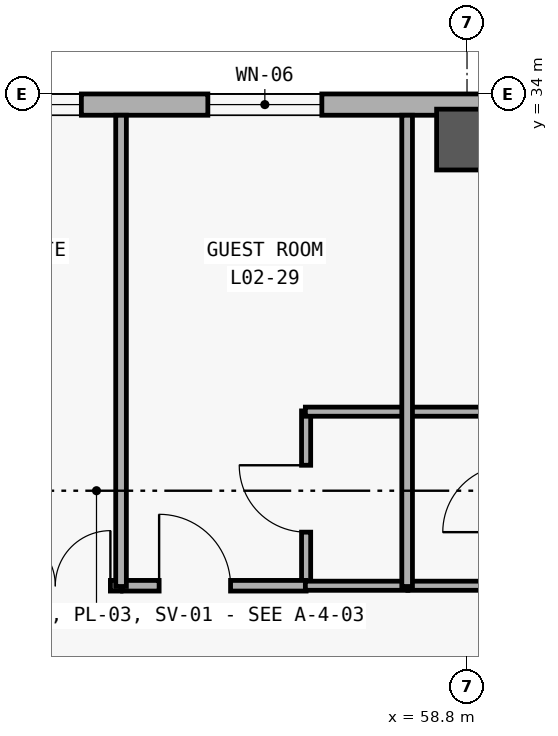
"""IFC4 building model, lengths in metres.
Left out: names, types, materials, properties, quantities, classifications, styles, units other than length and angle.
Written with IfcOpenShell. Run it as: python <this file> out.ifc"""

import sys

from ifc_helpers import new_model, si_unit, direction, frame, frame_2d, origin, origin_2d, place, context, subcontext, project, spatial, rectangle, extrude, element, fill, save


model = new_model("IFC4")
c1 = context("Model", 3, precision=1e-05, world=origin(), true_north=direction((0.0, 1.0)))
c2 = subcontext(c1, "Body", "Model", "MODEL_VIEW")
j1 = project(units=[si_unit("LENGTHUNIT", "METRE"), si_unit("PLANEANGLEUNIT", "RADIAN")], contexts=[c1])
p1 = place(None, origin())
s1 = spatial("IfcSite", under=j1, at=p1, CompositionType="ELEMENT")
p2 = place(p1, origin())
s2 = spatial("IfcBuilding", under=s1, at=p2, CompositionType="ELEMENT")
p3 = place(p2, frame((0.0, 0.0, 10.8)))
s3 = spatial("IfcBuildingStorey", under=s2, at=p3, CompositionType="ELEMENT", Elevation=10.8)
p4 = place(p3, frame((58.8, 33.4, 0.0), z_axis=(0.0, 0.0, 1.0), x_axis=(1.0, 0.0, 0.0)))
e1 = element("IfcColumn", 1, at=p4, inside=s3, PredefinedType="COLUMN", context=c2, shape_type="SweptSolid", body=[
    extrude(rectangle(XDim=0.8, YDim=0.8, at=origin_2d()), origin(), (0.0, 0.0, 1.0), 4.2),
])
p5 = place(p3, frame((8.68, 33.86, 0.0), z_axis=(0.0, 0.0, 1.0), x_axis=(1.0, 0.0, 0.0)))
e2 = element("IfcWall", 2, at=p5, inside=s3, PredefinedType="SOLIDWALL", context=c2, shape_type="SweptSolid", body=[
    extrude(rectangle(XDim=83.44, YDim=0.28, at=frame_2d((41.72, 0.0))), origin(), (0.0, 0.0, 1.0), 3.92),
])
p6 = place(p5, frame((5.07, 0.0, 0.85)))
e3 = element("IfcOpeningElement", 3, at=p6, cuts=e2, PredefinedType="OPENING", context=c2, shape_type="SweptSolid", body=[
    extrude(rectangle(XDim=1.7, YDim=2.0, at=frame_2d((0.85, 1.0))), frame((0.0, 0.15, 0.0), z_axis=(0.0, -1.0, 0.0), x_axis=(1.0, 0.0, 0.0)), (0.0, 0.0, 1.0), 0.3),
])
p7 = place(p5, frame((12.557, 0.0, 0.85)))
e4 = element("IfcOpeningElement", 4, at=p7, cuts=e2, PredefinedType="OPENING", context=c2, shape_type="SweptSolid", body=[
    extrude(rectangle(XDim=2.05, YDim=1.95, at=frame_2d((1.025, 0.975))), frame((0.0, 0.15, 0.0), z_axis=(0.0, -1.0, 0.0), x_axis=(1.0, 0.0, 0.0)), (0.0, 0.0, 1.0), 0.3),
])
p8 = place(p5, frame((16.256, 0.0, 0.85)))
e5 = element("IfcOpeningElement", 5, at=p8, cuts=e2, PredefinedType="OPENING", context=c2, shape_type="SweptSolid", body=[
    extrude(rectangle(XDim=2.18, YDim=1.95, at=frame_2d((1.09, 0.975))), frame((0.0, 0.15, 0.0), z_axis=(0.0, -1.0, 0.0), x_axis=(1.0, 0.0, 0.0)), (0.0, 0.0, 1.0), 0.3),
])
p9 = place(p5, frame((19.921, 0.0, 0.85)))
e6 = element("IfcOpeningElement", 6, at=p9, cuts=e2, PredefinedType="OPENING", context=c2, shape_type="SweptSolid", body=[
    extrude(rectangle(XDim=2.38, YDim=1.95, at=frame_2d((1.19, 0.975))), frame((0.0, 0.15, 0.0), z_axis=(0.0, -1.0, 0.0), x_axis=(1.0, 0.0, 0.0)), (0.0, 0.0, 1.0), 0.3),
])
p10 = place(p5, frame((23.635, 0.0, 0.85)))
e7 = element("IfcOpeningElement", 7, at=p10, cuts=e2, PredefinedType="OPENING", context=c2, shape_type="SweptSolid", body=[
    extrude(rectangle(XDim=2.48, YDim=2.0, at=frame_2d((1.24, 1.0))), frame((0.0, 0.15, 0.0), z_axis=(0.0, -1.0, 0.0), x_axis=(1.0, 0.0, 0.0)), (0.0, 0.0, 1.0), 0.3),
])
p11 = place(p5, frame((27.314, 0.0, 0.85)))
e8 = element("IfcOpeningElement", 8, at=p11, cuts=e2, PredefinedType="OPENING", context=c2, shape_type="SweptSolid", body=[
    extrude(rectangle(XDim=2.65, YDim=2.0, at=frame_2d((1.325, 1.0))), frame((0.0, 0.15, 0.0), z_axis=(0.0, -1.0, 0.0), x_axis=(1.0, 0.0, 0.0)), (0.0, 0.0, 1.0), 0.3),
])
p12 = place(p5, frame((31.503, 0.0, 0.85)))
e9 = element("IfcOpeningElement", 9, at=p12, cuts=e2, PredefinedType="OPENING", context=c2, shape_type="SweptSolid", body=[
    extrude(rectangle(XDim=1.8, YDim=1.8, at=frame_2d((0.9, 0.9))), frame((0.0, 0.15, 0.0), z_axis=(0.0, -1.0, 0.0), x_axis=(1.0, 0.0, 0.0)), (0.0, 0.0, 1.0), 0.3),
])
p13 = place(p5, frame((35.117, 0.0, 0.85)))
e10 = element("IfcOpeningElement", 10, at=p13, cuts=e2, PredefinedType="OPENING", context=c2, shape_type="SweptSolid", body=[
    extrude(rectangle(XDim=2.1, YDim=1.8, at=frame_2d((1.05, 0.9))), frame((0.0, 0.15, 0.0), z_axis=(0.0, -1.0, 0.0), x_axis=(1.0, 0.0, 0.0)), (0.0, 0.0, 1.0), 0.3),
])
p14 = place(p5, frame((38.731, 0.0, 0.85)))
e11 = element("IfcOpeningElement", 11, at=p14, cuts=e2, PredefinedType="OPENING", context=c2, shape_type="SweptSolid", body=[
    extrude(rectangle(XDim=2.4, YDim=1.8, at=frame_2d((1.2, 0.9))), frame((0.0, 0.15, 0.0), z_axis=(0.0, -1.0, 0.0), x_axis=(1.0, 0.0, 0.0)), (0.0, 0.0, 1.0), 0.3),
])
p15 = place(p5, frame((42.346, 0.0, 0.85)))
e12 = element("IfcOpeningElement", 12, at=p15, cuts=e2, PredefinedType="OPENING", context=c2, shape_type="SweptSolid", body=[
    extrude(rectangle(XDim=2.7, YDim=1.85, at=frame_2d((1.35, 0.925))), frame((0.0, 0.15, 0.0), z_axis=(0.0, -1.0, 0.0), x_axis=(1.0, 0.0, 0.0)), (0.0, 0.0, 1.0), 0.3),
])
p16 = place(p5, frame((46.71, 0.0, 0.85)))
e13 = element("IfcOpeningElement", 13, at=p16, cuts=e2, PredefinedType="OPENING", context=c2, shape_type="SweptSolid", body=[
    extrude(rectangle(XDim=1.5, YDim=1.75, at=frame_2d((0.75, 0.875))), frame((0.0, 0.15, 0.0), z_axis=(0.0, -1.0, 0.0), x_axis=(1.0, 0.0, 0.0)), (0.0, 0.0, 1.0), 0.3),
])
p17 = place(p5, frame((50.399, 0.0, 0.85)))
e14 = element("IfcOpeningElement", 14, at=p17, cuts=e2, PredefinedType="OPENING", context=c2, shape_type="SweptSolid", body=[
    extrude(rectangle(XDim=1.65, YDim=1.75, at=frame_2d((0.825, 0.875))), frame((0.0, 0.15, 0.0), z_axis=(0.0, -1.0, 0.0), x_axis=(1.0, 0.0, 0.0)), (0.0, 0.0, 1.0), 0.3),
])
p18 = place(p5, frame((54.014, 0.0, 0.85)))
e15 = element("IfcOpeningElement", 15, at=p18, cuts=e2, PredefinedType="OPENING", context=c2, shape_type="SweptSolid", body=[
    extrude(rectangle(XDim=1.95, YDim=1.75, at=frame_2d((0.975, 0.875))), frame((0.0, 0.15, 0.0), z_axis=(0.0, -1.0, 0.0), x_axis=(1.0, 0.0, 0.0)), (0.0, 0.0, 1.0), 0.3),
])
p19 = place(p5, frame((57.628, 0.0, 0.85)))
e16 = element("IfcOpeningElement", 16, at=p19, cuts=e2, PredefinedType="OPENING", context=c2, shape_type="SweptSolid", body=[
    extrude(rectangle(XDim=2.25, YDim=1.75, at=frame_2d((1.125, 0.875))), frame((0.0, 0.15, 0.0), z_axis=(0.0, -1.0, 0.0), x_axis=(1.0, 0.0, 0.0)), (0.0, 0.0, 1.0), 0.3),
])
p20 = place(p5, frame((61.242, 0.0, 0.85)))
e17 = element("IfcOpeningElement", 17, at=p20, cuts=e2, PredefinedType="OPENING", context=c2, shape_type="SweptSolid", body=[
    extrude(rectangle(XDim=2.55, YDim=1.8, at=frame_2d((1.275, 0.9))), frame((0.0, 0.15, 0.0), z_axis=(0.0, -1.0, 0.0), x_axis=(1.0, 0.0, 0.0)), (0.0, 0.0, 1.0), 0.3),
])
p21 = place(p5, frame((64.856, 0.0, 0.85)))
e18 = element("IfcOpeningElement", 18, at=p21, cuts=e2, PredefinedType="OPENING", context=c2, shape_type="SweptSolid", body=[
    extrude(rectangle(XDim=2.85, YDim=1.85, at=frame_2d((1.425, 0.925))), frame((0.0, 0.15, 0.0), z_axis=(0.0, -1.0, 0.0), x_axis=(1.0, 0.0, 0.0)), (0.0, 0.0, 1.0), 0.3),
])
p22 = place(p5, frame((69.345, 0.0, 0.85)))
e19 = element("IfcOpeningElement", 19, at=p22, cuts=e2, PredefinedType="OPENING", context=c2, shape_type="SweptSolid", body=[
    extrude(rectangle(XDim=1.4, YDim=1.6, at=frame_2d((0.7, 0.8))), frame((0.0, 0.15, 0.0), z_axis=(0.0, -1.0, 0.0), x_axis=(1.0, 0.0, 0.0)), (0.0, 0.0, 1.0), 0.3),
])
p23 = place(p5, frame((73.009, 0.0, 0.85)))
e20 = element("IfcOpeningElement", 20, at=p23, cuts=e2, PredefinedType="OPENING", context=c2, shape_type="SweptSolid", body=[
    extrude(rectangle(XDim=1.6, YDim=1.6, at=frame_2d((0.8, 0.8))), frame((0.0, 0.15, 0.0), z_axis=(0.0, -1.0, 0.0), x_axis=(1.0, 0.0, 0.0)), (0.0, 0.0, 1.0), 0.3),
])
p24 = place(p5, frame((76.674, 0.0, 0.85)))
e21 = element("IfcOpeningElement", 21, at=p24, cuts=e2, PredefinedType="OPENING", context=c2, shape_type="SweptSolid", body=[
    extrude(rectangle(XDim=1.8, YDim=1.6, at=frame_2d((0.9, 0.8))), frame((0.0, 0.15, 0.0), z_axis=(0.0, -1.0, 0.0), x_axis=(1.0, 0.0, 0.0)), (0.0, 0.0, 1.0), 0.3),
])
p25 = place(p5, frame((80.338, 0.0, 0.85)))
e22 = element("IfcOpeningElement", 22, at=p25, cuts=e2, PredefinedType="OPENING", context=c2, shape_type="SweptSolid", body=[
    extrude(rectangle(XDim=2.0, YDim=1.65, at=frame_2d((1.0, 0.825))), frame((0.0, 0.15, 0.0), z_axis=(0.0, -1.0, 0.0), x_axis=(1.0, 0.0, 0.0)), (0.0, 0.0, 1.0), 0.3),
])
p26 = place(p3, frame((56.683, 27.52, 0.0), z_axis=(0.0, 0.0, 1.0), x_axis=(0.0, 1.0, 0.0)))
e23 = element("IfcWall", 23, at=p26, inside=s3, PredefinedType="PARTITIONING", context=c2, shape_type="SweptSolid", body=[
    extrude(rectangle(XDim=2.31, YDim=0.12, at=frame_2d((1.155, 0.0))), origin(), (0.0, 0.0, 1.0), 3.02),
])
p27 = place(p26, frame((0.715, 0.0, 0.0)))
e24 = element("IfcOpeningElement", 24, at=p27, cuts=e23, PredefinedType="OPENING", context=c2, shape_type="SweptSolid", body=[
    extrude(rectangle(XDim=0.88, YDim=2.15, at=frame_2d((0.44, 1.075))), frame((0.0, 0.07, 0.0), z_axis=(0.0, -1.0, 0.0), x_axis=(1.0, 0.0, 0.0)), (0.0, 0.0, 1.0), 0.14),
])
p28 = place(p3, frame((51.833, 27.53, 0.0), z_axis=(0.0, 0.0, 1.0), x_axis=(1.0, 0.0, 0.0)))
e25 = element("IfcWall", 25, at=p28, inside=s3, PredefinedType="PARTITIONING", context=c2, shape_type="SweptSolid", body=[
    extrude(rectangle(XDim=2.415, YDim=0.14, at=frame_2d((1.208, 0.0))), origin(), (0.0, 0.0, 1.0), 3.02),
])
p29 = place(p28, frame((0.825, 0.0, 0.0)))
e26 = element("IfcOpeningElement", 26, at=p29, cuts=e25, PredefinedType="OPENING", context=c2, shape_type="SweptSolid", body=[
    extrude(rectangle(XDim=1.45, YDim=2.3, at=frame_2d((0.725, 1.15))), frame((0.0, 0.08, 0.0), z_axis=(0.0, -1.0, 0.0), x_axis=(1.0, 0.0, 0.0)), (0.0, 0.0, 1.0), 0.16),
])
p30 = place(p3, frame((54.268, 27.53, 0.0), z_axis=(0.0, 0.0, 1.0), x_axis=(1.0, 0.0, 0.0)))
e27 = element("IfcWall", 27, at=p30, inside=s3, PredefinedType="PARTITIONING", context=c2, shape_type="SweptSolid", body=[
    extrude(rectangle(XDim=2.415, YDim=0.14, at=frame_2d((1.208, 0.0))), origin(), (0.0, 0.0, 1.0), 3.02),
])
p31 = place(p30, frame((0.481, 0.0, 0.0)))
e28 = element("IfcOpeningElement", 28, at=p31, cuts=e27, PredefinedType="OPENING", context=c2, shape_type="SweptSolid", body=[
    extrude(rectangle(XDim=0.94, YDim=2.2, at=frame_2d((0.47, 1.1))), frame((0.0, 0.08, 0.0), z_axis=(0.0, -1.0, 0.0), x_axis=(1.0, 0.0, 0.0)), (0.0, 0.0, 1.0), 0.16),
])
for number, where, z_axis, x_axis in (
    (29, (56.673, 27.53, 0.0), (0.0, 0.0, 1.0), (1.0, 0.0, 0.0)),
    (30, (56.673, 29.82, 0.0), (0.0, 0.0, 1.0), (1.0, 0.0, 0.0)),
):
    element("IfcWall", number, at=place(p3, frame(where, z_axis=z_axis, x_axis=x_axis)), inside=s3, PredefinedType="PARTITIONING", context=c2, shape_type="SweptSolid", body=[
        extrude(rectangle(XDim=1.349, YDim=0.12, at=frame_2d((0.674, 0.0))), origin(), (0.0, 0.0, 1.0), 3.02),
    ])
p32 = place(p3, frame((58.022, 27.53, 0.0), z_axis=(0.0, 0.0, 1.0), x_axis=(1.0, 0.0, 0.0)))
e31 = element("IfcWall", 31, at=p32, inside=s3, PredefinedType="PARTITIONING", context=c2, shape_type="SweptSolid", body=[
    extrude(rectangle(XDim=1.339, YDim=0.12, at=frame_2d((0.669, 0.0))), origin(), (0.0, 0.0, 1.0), 3.02),
])
p33 = place(p3, frame((58.022, 29.82, 0.0), z_axis=(0.0, 0.0, 1.0), x_axis=(1.0, 0.0, 0.0)))
e32 = element("IfcWall", 32, at=p33, inside=s3, PredefinedType="PARTITIONING", context=c2, shape_type="SweptSolid", body=[
    extrude(rectangle(XDim=1.349, YDim=0.12, at=frame_2d((0.675, 0.0))), origin(), (0.0, 0.0, 1.0), 3.02),
])
for number, where, z_axis, x_axis in (
    (33, (54.248, 27.52, 0.0), (0.0, 0.0, 1.0), (0.0, 1.0, 0.0)),
    (34, (58.012, 27.52, 0.0), (0.0, 0.0, 1.0), (0.0, 1.0, 0.0)),
):
    element("IfcWall", number, at=place(p3, frame(where, z_axis=z_axis, x_axis=x_axis)), inside=s3, PredefinedType="PARTITIONING", context=c2, shape_type="SweptSolid", body=[
        extrude(rectangle(XDim=6.2, YDim=0.14, at=frame_2d((3.1, 0.0))), origin(), (0.0, 0.0, 1.0), 3.02),
    ])
p34 = place(p15, origin())
e35 = element("IfcWindow", 35, at=p34, inside=s3, PartitioningType="SINGLE_PANEL", PredefinedType="WINDOW", context=c2, shape_type="SweptSolid", body=[
    extrude(rectangle(XDim=2.7, YDim=1.85, at=frame_2d((1.35, 0.925))), frame((0.0, 0.03, 0.0), z_axis=(0.0, -1.0, 0.0), x_axis=(1.0, 0.0, 0.0)), (0.0, 0.0, 1.0), 0.06),
])
fill(e12, e35)
p35 = place(p16, origin())
e36 = element("IfcWindow", 36, at=p35, inside=s3, PartitioningType="SINGLE_PANEL", PredefinedType="WINDOW", context=c2, shape_type="SweptSolid", body=[
    extrude(rectangle(XDim=1.5, YDim=1.75, at=frame_2d((0.75, 0.875))), frame((0.0, 0.03, 0.0), z_axis=(0.0, -1.0, 0.0), x_axis=(1.0, 0.0, 0.0)), (0.0, 0.0, 1.0), 0.06),
])
fill(e13, e36)
p36 = place(p27, origin())
e37 = element("IfcDoor", 37, at=p36, inside=s3, OperationType="SINGLE_SWING_RIGHT", PredefinedType="DOOR", context=c2, shape_type="SweptSolid", body=[
    extrude(rectangle(XDim=0.88, YDim=2.15, at=frame_2d((0.44, 1.075))), frame((0.0, 0.025, 0.0), z_axis=(0.0, -1.0, 0.0), x_axis=(1.0, 0.0, 0.0)), (0.0, 0.0, 1.0), 0.05),
])
fill(e24, e37)
p37 = place(p29, origin())
e38 = element("IfcDoor", 38, at=p37, inside=s3, OperationType="DOUBLE_DOOR_SINGLE_SWING", PredefinedType="DOOR", context=c2, shape_type="SweptSolid", body=[
    extrude(rectangle(XDim=1.45, YDim=2.3, at=frame_2d((0.725, 1.15))), frame((0.0, 0.025, 0.0), z_axis=(0.0, -1.0, 0.0), x_axis=(1.0, 0.0, 0.0)), (0.0, 0.0, 1.0), 0.05),
])
fill(e26, e38)
p38 = place(p31, origin())
e39 = element("IfcDoor", 39, at=p38, inside=s3, OperationType="SINGLE_SWING_LEFT", PredefinedType="DOOR", context=c2, shape_type="SweptSolid", body=[
    extrude(rectangle(XDim=0.94, YDim=2.2, at=frame_2d((0.47, 1.1))), frame((0.0, 0.025, 0.0), z_axis=(0.0, -1.0, 0.0), x_axis=(1.0, 0.0, 0.0)), (0.0, 0.0, 1.0), 0.05),
])
fill(e28, e39)
save(model, sys.argv[1])
